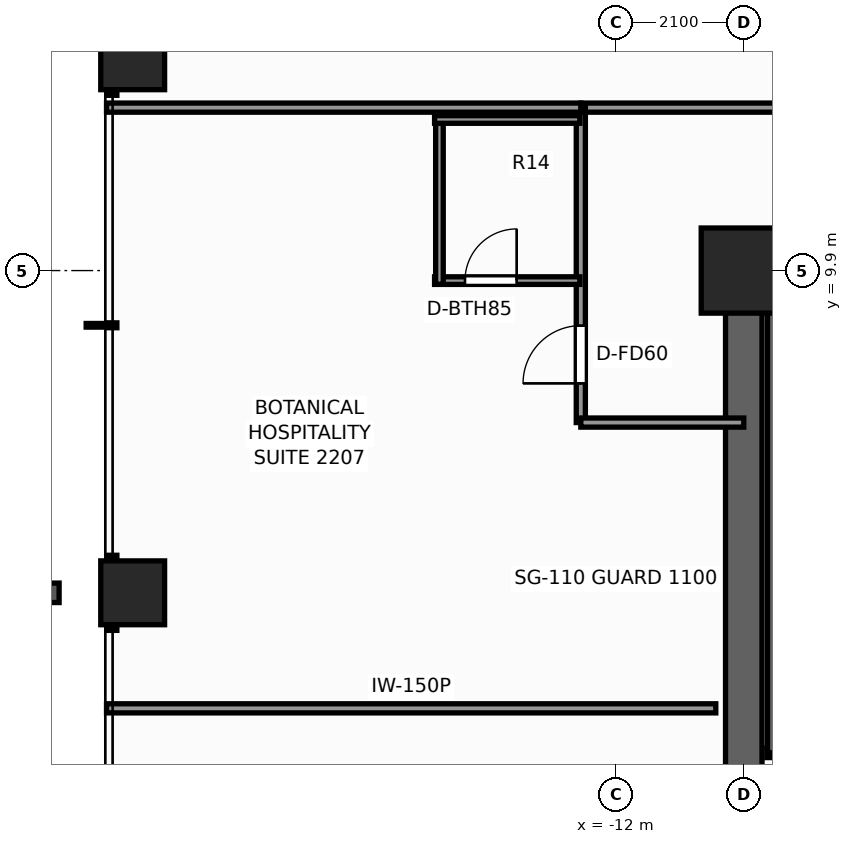
"""IFC4 building model, lengths in metres.
Left out: names, types, materials, properties, quantities, classifications, styles, units other than length and angle.
Written with IfcOpenShell. Run it as: python <this file> out.ifc"""

import sys

from ifc_helpers import new_model, si_unit, direction, frame, frame_2d, origin, origin_2d, place, context, subcontext, project, spatial, rectangle, extrude, element, fill, save


model = new_model("IFC4")
c1 = context("Model", 3, precision=1e-05, world=origin(), true_north=direction((0.0, 1.0)))
c2 = subcontext(c1, "Body", "Model", "MODEL_VIEW")
j1 = project(units=[si_unit("LENGTHUNIT", "METRE"), si_unit("PLANEANGLEUNIT", "RADIAN")], contexts=[c1])
p1 = place(None, origin())
s1 = spatial("IfcSite", under=j1, at=p1, CompositionType="ELEMENT")
p2 = place(p1, origin())
s2 = spatial("IfcBuilding", under=s1, at=p2, CompositionType="ELEMENT")
p3 = place(p2, frame((0.0, 0.0, 78.8)))
s3 = spatial("IfcBuildingStorey", under=s2, at=p3, CompositionType="ELEMENT", Elevation=78.8)
p4 = place(p3, frame((-10.2, 9.9, 0.0), z_axis=(0.0, 0.0, 1.0), x_axis=(1.0, 0.0, 0.0)))
e1 = element("IfcWall", 1, at=p4, inside=s3, PredefinedType="SHEAR", context=c2, shape_type="SweptSolid", body=[
    extrude(rectangle(XDim=14.62, YDim=0.6, at=frame_2d((7.31, 0.0))), origin(), (0.0, 0.0, 1.0), 3.3),
])
p5 = place(p3, frame((-9.9, -3.7, 0.0), z_axis=(0.0, 0.0, 1.0), x_axis=(0.0, 1.0, 0.0)))
e2 = element("IfcWall", 2, at=p5, inside=s3, PredefinedType="SHEAR", context=c2, shape_type="SweptSolid", body=[
    extrude(rectangle(XDim=13.3, YDim=0.6, at=frame_2d((6.65, 0.0))), origin(), (0.0, 0.0, 1.0), 3.3),
])
p6 = place(p5, frame((0.35, 0.0, 0.0)))
e3 = element("IfcOpeningElement", 3, at=p6, cuts=e2, PredefinedType="OPENING", context=c2, shape_type="SweptSolid", body=[
    extrude(rectangle(XDim=1.1, YDim=2.2, at=frame_2d((0.55, 1.1))), frame((0.0, 0.31, 0.0), z_axis=(0.0, -1.0, 0.0), x_axis=(1.0, 0.0, 0.0)), (0.0, 0.0, 1.0), 0.62),
])
p7 = place(p3, frame((-9.9, 9.9, 0.0), z_axis=(0.0, 0.0, 1.0), x_axis=(1.0, 0.0, 0.0)))
e4 = element("IfcColumn", 4, at=p7, inside=s3, PredefinedType="COLUMN", context=c2, shape_type="SweptSolid", body=[
    extrude(rectangle(XDim=1.4, YDim=1.4, at=origin_2d()), origin(), (0.0, 0.0, 1.0), 3.3),
])
for number, where, z_axis, x_axis in (
    (5, (-19.95, 4.6, 0.0), (0.0, 0.0, 1.0), (1.0, 0.0, 0.0)),
    (6, (-19.95, 13.4, 0.0), (0.0, 0.0, 1.0), (1.0, 0.0, 0.0)),
):
    element("IfcColumn", number, at=place(p3, frame(where, z_axis=z_axis, x_axis=x_axis)), inside=s3, PredefinedType="COLUMN", context=c2, shape_type="SweptSolid", body=[
        extrude(rectangle(XDim=1.05, YDim=1.05, at=origin_2d()), origin(), (0.0, 0.0, 1.0), 3.3),
    ])
p8 = place(p3, frame((-9.52, 1.97, 0.0), z_axis=(0.0, 0.0, 1.0), x_axis=(1.0, 0.0, 0.0)))
e7 = element("IfcWall", 7, at=p8, inside=s3, PredefinedType="SHEAR", context=c2, shape_type="SweptSolid", body=[
    extrude(rectangle(XDim=3.52, YDim=0.16, at=frame_2d((1.76, 0.0))), origin(), (0.0, 0.0, 1.0), 3.3),
])
p9 = place(p8, frame((1.15, 0.0, 0.0)))
e8 = element("IfcOpeningElement", 8, at=p9, cuts=e7, PredefinedType="OPENING", context=c2, shape_type="SweptSolid", body=[
    extrude(rectangle(XDim=1.1, YDim=2.2, at=frame_2d((0.55, 1.1))), frame((0.0, 0.09, 0.0), z_axis=(0.0, -1.0, 0.0), x_axis=(1.0, 0.0, 0.0)), (0.0, 0.0, 1.0), 0.18),
])
p10 = place(p3, frame((-9.52, 9.53, 0.0), z_axis=(0.0, 0.0, 1.0), x_axis=(1.0, 0.0, 0.0)))
e9 = element("IfcWall", 9, at=p10, inside=s3, PredefinedType="SHEAR", context=c2, shape_type="SweptSolid", body=[
    extrude(rectangle(XDim=3.52, YDim=0.16, at=frame_2d((1.76, 0.0))), origin(), (0.0, 0.0, 1.0), 3.3),
])
p11 = place(p3, frame((-9.43, 1.97, 0.0), z_axis=(0.0, 0.0, 1.0), x_axis=(0.0, 1.0, 0.0)))
e10 = element("IfcWall", 10, at=p11, inside=s3, PredefinedType="SHEAR", context=c2, shape_type="SweptSolid", body=[
    extrude(rectangle(XDim=7.56, YDim=0.16, at=frame_2d((3.78, 0.0))), origin(), (0.0, 0.0, 1.0), 3.3),
])
p12 = place(p3, frame((-12.58, 12.58, 0.0), z_axis=(0.0, 0.0, 1.0), x_axis=(1.0, 0.0, 0.0)))
e11 = element("IfcWall", 11, at=p12, inside=s3, PredefinedType="PARTITIONING", context=c2, shape_type="SweptSolid", body=[
    extrude(rectangle(XDim=25.16, YDim=0.15, at=frame_2d((12.58, 0.0))), origin(), (0.0, 0.0, 1.0), 2.292),
])
p13 = place(p12, frame((3.657, 0.0, 0.0)))
e12 = element("IfcOpeningElement", 12, at=p13, cuts=e11, PredefinedType="OPENING", context=c2, shape_type="SweptSolid", body=[
    extrude(rectangle(XDim=0.9, YDim=2.06, at=frame_2d((0.45, 1.03))), frame((0.0, 0.085, 0.0), z_axis=(0.0, -1.0, 0.0), x_axis=(1.0, 0.0, 0.0)), (0.0, 0.0, 1.0), 0.17),
])
p14 = place(p12, frame((6.082, 0.0, 0.0)))
e13 = element("IfcOpeningElement", 13, at=p14, cuts=e11, PredefinedType="OPENING", context=c2, shape_type="SweptSolid", body=[
    extrude(rectangle(XDim=0.9, YDim=2.06, at=frame_2d((0.45, 1.03))), frame((0.0, 0.085, 0.0), z_axis=(0.0, -1.0, 0.0), x_axis=(1.0, 0.0, 0.0)), (0.0, 0.0, 1.0), 0.17),
])
p15 = place(p12, frame((8.836, 0.0, 0.0)))
e14 = element("IfcOpeningElement", 14, at=p15, cuts=e11, PredefinedType="OPENING", context=c2, shape_type="SweptSolid", body=[
    extrude(rectangle(XDim=0.95, YDim=2.06, at=frame_2d((0.475, 1.03))), frame((0.0, 0.085, 0.0), z_axis=(0.0, -1.0, 0.0), x_axis=(1.0, 0.0, 0.0)), (0.0, 0.0, 1.0), 0.17),
])
p16 = place(p12, frame((14.16, 0.0, 0.0)))
e15 = element("IfcOpeningElement", 15, at=p16, cuts=e11, PredefinedType="OPENING", context=c2, shape_type="SweptSolid", body=[
    extrude(rectangle(XDim=0.9, YDim=2.06, at=frame_2d((0.45, 1.03))), frame((0.0, 0.085, 0.0), z_axis=(0.0, -1.0, 0.0), x_axis=(1.0, 0.0, 0.0)), (0.0, 0.0, 1.0), 0.17),
])
p17 = place(p12, frame((20.341, 0.0, 0.0)))
e16 = element("IfcOpeningElement", 16, at=p17, cuts=e11, PredefinedType="OPENING", context=c2, shape_type="SweptSolid", body=[
    extrude(rectangle(XDim=0.9, YDim=2.06, at=frame_2d((0.45, 1.03))), frame((0.0, 0.085, 0.0), z_axis=(0.0, -1.0, 0.0), x_axis=(1.0, 0.0, 0.0)), (0.0, 0.0, 1.0), 0.17),
])
p18 = place(p3, frame((-12.58, 7.4, 0.0), z_axis=(0.0, 0.0, 1.0), x_axis=(0.0, 1.0, 0.0)))
e17 = element("IfcWall", 17, at=p18, inside=s3, PredefinedType="PARTITIONING", context=c2, shape_type="SweptSolid", body=[
    extrude(rectangle(XDim=5.18, YDim=0.15, at=frame_2d((2.59, 0.0))), origin(), (0.0, 0.0, 1.0), 2.292),
])
p19 = place(p18, frame((0.645, 0.0, 0.0)))
e18 = element("IfcOpeningElement", 18, at=p19, cuts=e17, PredefinedType="OPENING", context=c2, shape_type="SweptSolid", body=[
    extrude(rectangle(XDim=0.95, YDim=2.06, at=frame_2d((0.475, 1.03))), frame((0.0, 0.085, 0.0), z_axis=(0.0, -1.0, 0.0), x_axis=(1.0, 0.0, 0.0)), (0.0, 0.0, 1.0), 0.17),
])
p20 = place(p3, frame((-12.58, 7.4, 0.0), z_axis=(0.0, 0.0, 1.0), x_axis=(1.0, 0.0, 0.0)))
e19 = element("IfcWall", 19, at=p20, inside=s3, PredefinedType="PARTITIONING", context=c2, shape_type="SweptSolid", body=[
    extrude(rectangle(XDim=2.68, YDim=0.15, at=frame_2d((1.34, 0.0))), origin(), (0.0, 0.0, 1.0), 3.08),
])
p21 = place(p3, frame((-20.38, 12.58, 0.0), z_axis=(0.0, 0.0, 1.0), x_axis=(1.0, 0.0, 0.0)))
e20 = element("IfcWall", 20, at=p21, inside=s3, PredefinedType="PARTITIONING", context=c2, shape_type="SweptSolid", body=[
    extrude(rectangle(XDim=7.8, YDim=0.15, at=frame_2d((3.9, 0.0))), origin(), (0.0, 0.0, 1.0), 2.292),
])
p22 = place(p3, frame((-20.38, 2.7, 0.0), z_axis=(0.0, 0.0, 1.0), x_axis=(1.0, 0.0, 0.0)))
e21 = element("IfcWall", 21, at=p22, inside=s3, PredefinedType="PARTITIONING", context=c2, shape_type="SweptSolid", body=[
    extrude(rectangle(XDim=10.02, YDim=0.15, at=frame_2d((5.01, 0.0))), origin(), (0.0, 0.0, 1.0), 2.449),
])
p23 = place(p3, frame((-14.985, 9.735, 0.0), z_axis=(0.0, 0.0, 1.0), x_axis=(1.0, 0.0, 0.0)))
e22 = element("IfcWall", 22, at=p23, inside=s3, PredefinedType="PARTITIONING", context=c2, shape_type="SweptSolid", body=[
    extrude(rectangle(XDim=2.39, YDim=0.125, at=frame_2d((1.195, 0.0))), origin(), (0.0, 0.0, 1.0), 3.08),
])
p24 = place(p23, frame((0.5, 0.0, 0.0)))
e23 = element("IfcOpeningElement", 23, at=p24, cuts=e22, PredefinedType="OPENING", context=c2, shape_type="SweptSolid", body=[
    extrude(rectangle(XDim=0.85, YDim=2.03, at=frame_2d((0.425, 1.015))), frame((0.0, 0.073, 0.0), z_axis=(0.0, -1.0, 0.0), x_axis=(1.0, 0.0, 0.0)), (0.0, 0.0, 1.0), 0.145),
])
p25 = place(p3, frame((-14.905, 9.675, 0.0), z_axis=(0.0, 0.0, 1.0), x_axis=(0.0, 1.0, 0.0)))
e24 = element("IfcWall", 24, at=p25, inside=s3, PredefinedType="PARTITIONING", context=c2, shape_type="SweptSolid", body=[
    extrude(rectangle(XDim=2.77, YDim=0.125, at=frame_2d((1.385, 0.0))), origin(), (0.0, 0.0, 1.0), 2.292),
])
p26 = place(p3, frame((-14.985, 12.385, 0.0), z_axis=(0.0, 0.0, 1.0), x_axis=(1.0, 0.0, 0.0)))
e25 = element("IfcWall", 25, at=p26, inside=s3, PredefinedType="PARTITIONING", context=c2, shape_type="SweptSolid", body=[
    extrude(rectangle(XDim=2.39, YDim=0.125, at=frame_2d((1.195, 0.0))), origin(), (0.0, 0.0, 1.0), 3.08),
])
p27 = place(p24, origin())
e26 = element("IfcDoor", 26, at=p27, inside=s3, OperationType="SINGLE_SWING_RIGHT", PredefinedType="DOOR", context=c2, shape_type="SweptSolid", body=[
    extrude(rectangle(XDim=0.85, YDim=2.03, at=frame_2d((0.425, 1.015))), frame((0.0, 0.025, 0.0), z_axis=(0.0, -1.0, 0.0), x_axis=(1.0, 0.0, 0.0)), (0.0, 0.0, 1.0), 0.05),
])
fill(e23, e26)
p28 = place(p19, origin())
e27 = element("IfcDoor", 27, at=p28, inside=s3, OperationType="SINGLE_SWING_LEFT", PredefinedType="DOOR", context=c2, shape_type="SweptSolid", body=[
    extrude(rectangle(XDim=0.95, YDim=2.06, at=frame_2d((0.475, 1.03))), frame((0.0, 0.025, 0.0), z_axis=(0.0, -1.0, 0.0), x_axis=(1.0, 0.0, 0.0)), (0.0, 0.0, 1.0), 0.05),
])
fill(e18, e27)
save(model, sys.argv[1])
